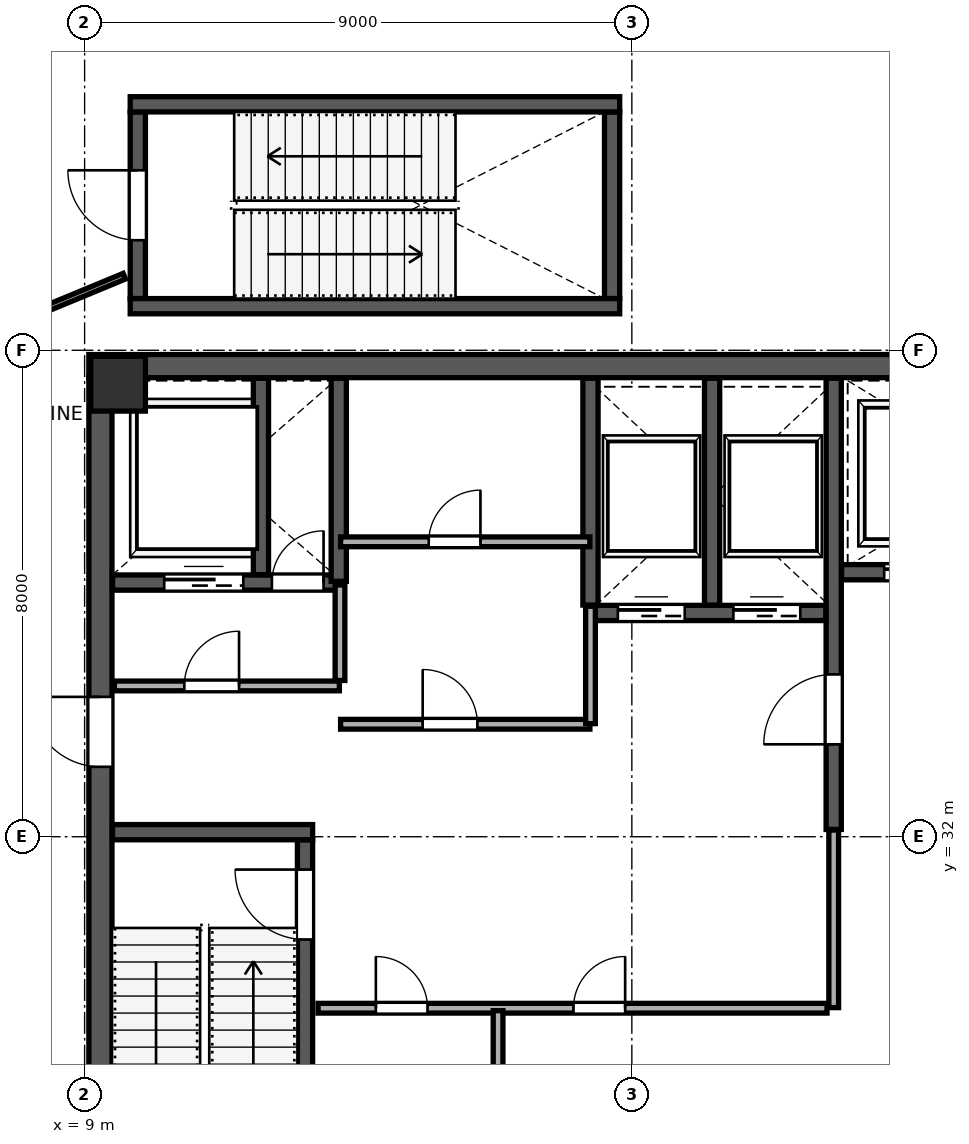
"""IFC4 building model, lengths in metres.
Left out: names, types, materials, properties, quantities, classifications, styles, units other than length and angle.
Written with IfcOpenShell. Run it as: python <this file> out.ifc"""

import sys

from ifc_helpers import new_model, si_unit, direction, frame, frame_2d, origin, origin_2d, place, context, subcontext, project, spatial, rectangle, extrude, source, transform, mapped, element, fill, save


model = new_model("IFC4")
c1 = context("Model", 3, precision=1e-05, world=origin(), true_north=direction((0.0, 1.0)))
c2 = subcontext(c1, "Body", "Model", "MODEL_VIEW")
j1 = project(units=[si_unit("LENGTHUNIT", "METRE"), si_unit("PLANEANGLEUNIT", "RADIAN")], contexts=[c1])
p1 = place(None, origin())
s1 = spatial("IfcSite", under=j1, at=p1, CompositionType="ELEMENT")
p2 = place(p1, origin())
s2 = spatial("IfcBuilding", under=s1, at=p2, CompositionType="ELEMENT")
p3 = place(p2, frame((0.0, 0.0, 355.2)))
s3 = spatial("IfcBuildingStorey", under=s2, at=p3, CompositionType="ELEMENT", Elevation=355.2)
m1 = source(origin(), c2, "Body", "SweptSolid", [
    extrude(rectangle(XDim=0.9, YDim=0.9, at=origin_2d()), origin(), (0.0, 0.0, 1.0), 4.799),
])
p4 = place(p3, frame((9.55, 39.45, 0.001), z_axis=(0.0, 0.0, 1.0), x_axis=(1.0, 0.0, 0.0)))
e1 = element("IfcColumn", 1, at=p4, inside=s3, PredefinedType="COLUMN", context=c2, shape_type="MappedRepresentation", body=[
    mapped(m1, transform((0.0, 0.0, 0.0), scale=1.0)),
])
p5 = place(p3, frame((26.171, 52.953, 0.0), z_axis=(0.0, 0.0, 1.0), x_axis=(-0.923878251708, -0.382686524484, 0.0)))
e2 = element("IfcWall", 2, at=p5, inside=s3, PredefinedType="SOLIDWALL", context=c2, shape_type="SweptSolid", body=[
    extrude(rectangle(XDim=26.668, YDim=0.24, at=frame_2d((13.334, 0.0))), origin(), (0.0, 0.0, 1.0), 4.52),
])
p6 = place(p5, frame((13.454, 0.0, 0.45)))
e3 = element("IfcOpeningElement", 3, at=p6, cuts=e2, PredefinedType="OPENING", context=c2, shape_type="SweptSolid", body=[
    extrude(rectangle(XDim=3.2, YDim=2.5, at=frame_2d((1.6, 1.25))), frame((0.0, 0.13, 0.0), z_axis=(0.0, -1.0, 0.0), x_axis=(1.0, 0.0, 0.0)), (0.0, 0.0, 1.0), 0.26),
])
p7 = place(p5, frame((21.304, 0.0, 0.45)))
e4 = element("IfcOpeningElement", 4, at=p7, cuts=e2, PredefinedType="OPENING", context=c2, shape_type="SweptSolid", body=[
    extrude(rectangle(XDim=3.2, YDim=2.5, at=frame_2d((1.6, 1.25))), frame((0.0, 0.13, 0.0), z_axis=(0.0, -1.0, 0.0), x_axis=(1.0, 0.0, 0.0)), (0.0, 0.0, 1.0), 0.26),
])
p8 = place(p3, frame((9.26, 24.45, 0.0), z_axis=(0.0, 0.0, 1.0), x_axis=(0.0, 1.0, 0.0)))
e5 = element("IfcWall", 5, at=p8, inside=s3, PredefinedType="SHEAR", context=c2, shape_type="SweptSolid", body=[
    extrude(rectangle(XDim=15.1, YDim=0.38, at=frame_2d((7.55, 0.0))), origin(), (0.0, 0.0, 1.0), 4.52),
])
p9 = place(p8, frame((8.7, 0.0, 0.0)))
e6 = element("IfcOpeningElement", 6, at=p9, cuts=e5, PredefinedType="OPENING", context=c2, shape_type="SweptSolid", body=[
    extrude(rectangle(XDim=1.15, YDim=2.2, at=frame_2d((0.575, 1.1))), frame((0.0, 0.2, 0.0), z_axis=(0.0, -1.0, 0.0), x_axis=(1.0, 0.0, 0.0)), (0.0, 0.0, 1.0), 0.4),
])
p10 = place(p3, frame((9.07, 39.74, 0.0), z_axis=(0.0, 0.0, 1.0), x_axis=(1.0, 0.0, 0.0)))
e7 = element("IfcWall", 7, at=p10, inside=s3, PredefinedType="SHEAR", context=c2, shape_type="SweptSolid", body=[
    extrude(rectangle(XDim=17.86, YDim=0.38, at=frame_2d((8.93, 0.0))), origin(), (0.0, 0.0, 1.0), 4.52),
])
p11 = place(p3, frame((12.625, 24.46, 0.0), z_axis=(0.0, 0.0, 1.0), x_axis=(0.0, 1.0, 0.0)))
e8 = element("IfcWall", 8, at=p11, inside=s3, PredefinedType="SHEAR", context=c2, shape_type="SweptSolid", body=[
    extrude(rectangle(XDim=7.49, YDim=0.25, at=frame_2d((3.745, 0.0))), origin(), (0.0, 0.0, 1.0), 4.52),
])
p12 = place(p11, frame((5.85, 0.0, 0.0)))
e9 = element("IfcOpeningElement", 9, at=p12, cuts=e8, PredefinedType="OPENING", context=c2, shape_type="SweptSolid", body=[
    extrude(rectangle(XDim=1.15, YDim=2.2, at=frame_2d((0.575, 1.1))), frame((0.0, 0.135, 0.0), z_axis=(0.0, -1.0, 0.0), x_axis=(1.0, 0.0, 0.0)), (0.0, 0.0, 1.0), 0.27),
])
p13 = place(p3, frame((9.46, 32.075, 0.0), z_axis=(0.0, 0.0, 1.0), x_axis=(1.0, 0.0, 0.0)))
e10 = element("IfcWall", 10, at=p13, inside=s3, PredefinedType="SHEAR", context=c2, shape_type="SweptSolid", body=[
    extrude(rectangle(XDim=3.29, YDim=0.25, at=frame_2d((1.645, 0.0))), origin(), (0.0, 0.0, 1.0), 4.52),
])
p14 = place(p3, frame((21.32, 32.12, 0.0), z_axis=(0.0, 0.0, 1.0), x_axis=(0.0, 1.0, 0.0)))
e11 = element("IfcWall", 11, at=p14, inside=s3, PredefinedType="SHEAR", context=c2, shape_type="SweptSolid", body=[
    extrude(rectangle(XDim=7.42, YDim=0.25, at=frame_2d((3.71, 0.0))), origin(), (0.0, 0.0, 1.0), 4.52),
])
p15 = place(p14, frame((1.4, 0.0, 0.0)))
e12 = element("IfcOpeningElement", 12, at=p15, cuts=e11, PredefinedType="OPENING", context=c2, shape_type="SweptSolid", body=[
    extrude(rectangle(XDim=1.15, YDim=2.2, at=frame_2d((0.575, 1.1))), frame((0.0, 0.135, 0.0), z_axis=(0.0, -1.0, 0.0), x_axis=(1.0, 0.0, 0.0)), (0.0, 0.0, 1.0), 0.27),
])
p16 = place(p3, frame((9.46, 36.18, 0.0), z_axis=(0.0, 0.0, 1.0), x_axis=(1.0, 0.0, 0.0)))
e13 = element("IfcWall", 13, at=p16, inside=s3, PredefinedType="SHEAR", context=c2, shape_type="SweptSolid", body=[
    extrude(rectangle(XDim=3.79, YDim=0.25, at=frame_2d((1.895, 0.0))), origin(), (0.0, 0.0, 1.0), 4.52),
])
p17 = place(p16, frame((2.62, 0.0, 0.0)))
e14 = element("IfcOpeningElement", 14, at=p17, cuts=e13, PredefinedType="OPENING", context=c2, shape_type="SweptSolid", body=[
    extrude(rectangle(XDim=0.85, YDim=2.1, at=frame_2d((0.425, 1.05))), frame((0.0, 0.135, 0.0), z_axis=(0.0, -1.0, 0.0), x_axis=(1.0, 0.0, 0.0)), (0.0, 0.0, 1.0), 0.27),
])
p18 = place(p16, frame((0.85, 0.0, 0.0)))
e15 = element("IfcOpeningElement", 15, at=p18, cuts=e13, PredefinedType="OPENING", context=c2, shape_type="SweptSolid", body=[
    extrude(rectangle(XDim=1.3, YDim=2.25, at=frame_2d((0.65, 1.125))), frame((0.0, 0.135, 0.0), z_axis=(0.0, -1.0, 0.0), x_axis=(1.0, 0.0, 0.0)), (0.0, 0.0, 1.0), 0.27),
])
p19 = place(p3, frame((11.9, 36.31, 0.0), z_axis=(0.0, 0.0, 1.0), x_axis=(0.0, 1.0, 0.0)))
e16 = element("IfcWall", 16, at=p19, inside=s3, PredefinedType="SHEAR", context=c2, shape_type="SweptSolid", body=[
    extrude(rectangle(XDim=3.23, YDim=0.25, at=frame_2d((1.615, 0.0))), origin(), (0.0, 0.0, 1.0), 4.52),
])
p20 = place(p3, frame((21.45, 36.35, 0.0), z_axis=(0.0, 0.0, 1.0), x_axis=(1.0, 0.0, 0.0)))
e17 = element("IfcWall", 17, at=p20, inside=s3, PredefinedType="SHEAR", context=c2, shape_type="SweptSolid", body=[
    extrude(rectangle(XDim=5.09, YDim=0.25, at=frame_2d((2.545, 0.0))), origin(), (0.0, 0.0, 1.0), 4.52),
])
p21 = place(p20, frame((0.7, 0.0, 0.0)))
e18 = element("IfcOpeningElement", 18, at=p21, cuts=e17, PredefinedType="OPENING", context=c2, shape_type="SweptSolid", body=[
    extrude(rectangle(XDim=1.2, YDim=2.2, at=frame_2d((0.6, 1.1))), frame((0.0, 0.135, 0.0), z_axis=(0.0, -1.0, 0.0), x_axis=(1.0, 0.0, 0.0)), (0.0, 0.0, 1.0), 0.27),
])
p22 = place(p20, frame((3.25, 0.0, 0.0)))
e19 = element("IfcOpeningElement", 19, at=p22, cuts=e17, PredefinedType="OPENING", context=c2, shape_type="SweptSolid", body=[
    extrude(rectangle(XDim=1.2, YDim=2.2, at=frame_2d((0.6, 1.1))), frame((0.0, 0.135, 0.0), z_axis=(0.0, -1.0, 0.0), x_axis=(1.0, 0.0, 0.0)), (0.0, 0.0, 1.0), 0.27),
])
p23 = place(p3, frame((13.18, 36.2, 0.0), z_axis=(0.0, 0.0, 1.0), x_axis=(0.0, 1.0, 0.0)))
e20 = element("IfcWall", 20, at=p23, inside=s3, PredefinedType="SHEAR", context=c2, shape_type="SweptSolid", body=[
    extrude(rectangle(XDim=3.34, YDim=0.25, at=frame_2d((1.67, 0.0))), origin(), (0.0, 0.0, 1.0), 4.52),
])
p24 = place(p3, frame((17.32, 35.68, 0.0), z_axis=(0.0, 0.0, 1.0), x_axis=(1.0, 0.0, 0.0)))
e21 = element("IfcWall", 21, at=p24, inside=s3, PredefinedType="SHEAR", context=c2, shape_type="SweptSolid", body=[
    extrude(rectangle(XDim=3.87, YDim=0.25, at=frame_2d((1.935, 0.0))), origin(), (0.0, 0.0, 1.0), 4.52),
])
p25 = place(p24, frame((0.45, 0.0, 0.0)))
e22 = element("IfcOpeningElement", 22, at=p25, cuts=e21, PredefinedType="OPENING", context=c2, shape_type="SweptSolid", body=[
    extrude(rectangle(XDim=1.1, YDim=2.2, at=frame_2d((0.55, 1.1))), frame((0.0, 0.135, 0.0), z_axis=(0.0, -1.0, 0.0), x_axis=(1.0, 0.0, 0.0)), (0.0, 0.0, 1.0), 0.27),
])
p26 = place(p24, frame((2.35, 0.0, 0.0)))
e23 = element("IfcOpeningElement", 23, at=p26, cuts=e21, PredefinedType="OPENING", context=c2, shape_type="SweptSolid", body=[
    extrude(rectangle(XDim=1.1, YDim=2.2, at=frame_2d((0.55, 1.1))), frame((0.0, 0.135, 0.0), z_axis=(0.0, -1.0, 0.0), x_axis=(1.0, 0.0, 0.0)), (0.0, 0.0, 1.0), 0.27),
])
for number, where, z_axis, x_axis in (
    (24, (17.32, 35.81, 0.0), (0.0, 0.0, 1.0), (0.0, 1.0, 0.0)),
    (25, (19.32, 35.81, 0.0), (0.0, 0.0, 1.0), (0.0, 1.0, 0.0)),
):
    element("IfcWall", number, at=place(p3, frame(where, z_axis=z_axis, x_axis=x_axis)), inside=s3, PredefinedType="SHEAR", context=c2, shape_type="SweptSolid", body=[
        extrude(rectangle(XDim=3.73, YDim=0.25, at=frame_2d((1.865, 0.0))), origin(), (0.0, 0.0, 1.0), 4.52),
    ])
p27 = place(p3, frame((9.875, 40.85, 0.0), z_axis=(0.0, 0.0, 1.0), x_axis=(0.0, 1.0, 0.0)))
e26 = element("IfcWall", 26, at=p27, inside=s3, PredefinedType="SHEAR", context=c2, shape_type="SweptSolid", body=[
    extrude(rectangle(XDim=3.07, YDim=0.25, at=frame_2d((1.535, 0.0))), origin(), (0.0, 0.0, 1.0), 4.52),
])
p28 = place(p27, frame((0.96, 0.0, 0.0)))
e27 = element("IfcOpeningElement", 27, at=p28, cuts=e26, PredefinedType="OPENING", context=c2, shape_type="SweptSolid", body=[
    extrude(rectangle(XDim=1.15, YDim=2.2, at=frame_2d((0.575, 1.1))), frame((0.0, 0.135, 0.0), z_axis=(0.0, -1.0, 0.0), x_axis=(1.0, 0.0, 0.0)), (0.0, 0.0, 1.0), 0.27),
])
p29 = place(p3, frame((17.675, 40.85, 0.0), z_axis=(0.0, 0.0, 1.0), x_axis=(0.0, 1.0, 0.0)))
e28 = element("IfcWall", 28, at=p29, inside=s3, PredefinedType="SHEAR", context=c2, shape_type="SweptSolid", body=[
    extrude(rectangle(XDim=3.07, YDim=0.25, at=frame_2d((1.535, 0.0))), origin(), (0.0, 0.0, 1.0), 4.52),
])
for number, where, z_axis, x_axis in (
    (29, (9.75, 40.725, 0.0), (0.0, 0.0, 1.0), (1.0, 0.0, 0.0)),
    (30, (9.75, 44.045, 0.0), (0.0, 0.0, 1.0), (1.0, 0.0, 0.0)),
):
    element("IfcWall", number, at=place(p3, frame(where, z_axis=z_axis, x_axis=x_axis)), inside=s3, PredefinedType="SHEAR", context=c2, shape_type="SweptSolid", body=[
        extrude(rectangle(XDim=8.05, YDim=0.25, at=frame_2d((4.025, 0.0))), origin(), (0.0, 0.0, 1.0), 4.52),
    ])
p30 = place(p3, frame((9.49, 34.48, 0.0), z_axis=(0.0, 0.0, 1.0), x_axis=(1.0, 0.0, 0.0)))
e31 = element("IfcWall", 31, at=p30, inside=s3, PredefinedType="PARTITIONING", context=c2, shape_type="SweptSolid", body=[
    extrude(rectangle(XDim=3.7, YDim=0.16, at=frame_2d((1.85, 0.0))), origin(), (0.0, 0.0, 1.0), 4.52),
])
p31 = place(p30, frame((1.15, 0.0, 0.0)))
e32 = element("IfcOpeningElement", 32, at=p31, cuts=e31, PredefinedType="OPENING", context=c2, shape_type="SweptSolid", body=[
    extrude(rectangle(XDim=0.9, YDim=2.15, at=frame_2d((0.45, 1.075))), frame((0.0, 0.09, 0.0), z_axis=(0.0, -1.0, 0.0), x_axis=(1.0, 0.0, 0.0)), (0.0, 0.0, 1.0), 0.18),
])
p32 = place(p3, frame((13.2, 34.57, 0.0), z_axis=(0.0, 0.0, 1.0), x_axis=(0.0, 1.0, 0.0)))
e33 = element("IfcWall", 33, at=p32, inside=s3, PredefinedType="PARTITIONING", context=c2, shape_type="SweptSolid", body=[
    extrude(rectangle(XDim=1.57, YDim=0.16, at=frame_2d((0.785, 0.0))), origin(), (0.0, 0.0, 1.0), 4.52),
])
p33 = place(p3, frame((13.21, 33.85, 0.0), z_axis=(0.0, 0.0, 1.0), x_axis=(1.0, 0.0, 0.0)))
e34 = element("IfcWall", 34, at=p33, inside=s3, PredefinedType="PARTITIONING", context=c2, shape_type="SweptSolid", body=[
    extrude(rectangle(XDim=4.1, YDim=0.16, at=frame_2d((2.05, 0.0))), origin(), (0.0, 0.0, 1.0), 4.52),
])
p34 = place(p33, frame((1.35, 0.0, 0.0)))
e35 = element("IfcOpeningElement", 35, at=p34, cuts=e34, PredefinedType="OPENING", context=c2, shape_type="SweptSolid", body=[
    extrude(rectangle(XDim=0.9, YDim=2.15, at=frame_2d((0.45, 1.075))), frame((0.0, 0.09, 0.0), z_axis=(0.0, -1.0, 0.0), x_axis=(1.0, 0.0, 0.0)), (0.0, 0.0, 1.0), 0.18),
])
p35 = place(p3, frame((17.32, 33.86, 0.0), z_axis=(0.0, 0.0, 1.0), x_axis=(0.0, 1.0, 0.0)))
e36 = element("IfcWall", 36, at=p35, inside=s3, PredefinedType="PARTITIONING", context=c2, shape_type="SweptSolid", body=[
    extrude(rectangle(XDim=1.93, YDim=0.16, at=frame_2d((0.965, 0.0))), origin(), (0.0, 0.0, 1.0), 4.52),
])
p36 = place(p3, frame((13.21, 36.85, 0.0), z_axis=(0.0, 0.0, 1.0), x_axis=(1.0, 0.0, 0.0)))
e37 = element("IfcWall", 37, at=p36, inside=s3, PredefinedType="PARTITIONING", context=c2, shape_type="SweptSolid", body=[
    extrude(rectangle(XDim=4.1, YDim=0.16, at=frame_2d((2.05, 0.0))), origin(), (0.0, 0.0, 1.0), 4.52),
])
p37 = place(p36, frame((1.45, 0.0, 0.0)))
e38 = element("IfcOpeningElement", 38, at=p37, cuts=e37, PredefinedType="OPENING", context=c2, shape_type="SweptSolid", body=[
    extrude(rectangle(XDim=0.85, YDim=2.1, at=frame_2d((0.425, 1.05))), frame((0.0, 0.09, 0.0), z_axis=(0.0, -1.0, 0.0), x_axis=(1.0, 0.0, 0.0)), (0.0, 0.0, 1.0), 0.18),
])
p38 = place(p3, frame((12.84, 29.18, 0.0), z_axis=(0.0, 0.0, 1.0), x_axis=(1.0, 0.0, 0.0)))
e39 = element("IfcWall", 39, at=p38, inside=s3, PredefinedType="PARTITIONING", context=c2, shape_type="SweptSolid", body=[
    extrude(rectangle(XDim=8.37, YDim=0.16, at=frame_2d((4.185, 0.0))), origin(), (0.0, 0.0, 1.0), 4.52),
])
p39 = place(p38, frame((0.95, 0.0, 0.0)))
e40 = element("IfcOpeningElement", 40, at=p39, cuts=e39, PredefinedType="OPENING", context=c2, shape_type="SweptSolid", body=[
    extrude(rectangle(XDim=0.85, YDim=2.1, at=frame_2d((0.425, 1.05))), frame((0.0, 0.09, 0.0), z_axis=(0.0, -1.0, 0.0), x_axis=(1.0, 0.0, 0.0)), (0.0, 0.0, 1.0), 0.18),
])
p40 = place(p38, frame((4.2, 0.0, 0.0)))
e41 = element("IfcOpeningElement", 41, at=p40, cuts=e39, PredefinedType="OPENING", context=c2, shape_type="SweptSolid", body=[
    extrude(rectangle(XDim=0.85, YDim=2.1, at=frame_2d((0.425, 1.05))), frame((0.0, 0.09, 0.0), z_axis=(0.0, -1.0, 0.0), x_axis=(1.0, 0.0, 0.0)), (0.0, 0.0, 1.0), 0.18),
])
p41 = place(p3, frame((15.8, 24.54, 0.0), z_axis=(0.0, 0.0, 1.0), x_axis=(0.0, 1.0, 0.0)))
e42 = element("IfcWall", 42, at=p41, inside=s3, PredefinedType="PARTITIONING", context=c2, shape_type="SweptSolid", body=[
    extrude(rectangle(XDim=4.6, YDim=0.16, at=frame_2d((2.3, 0.0))), origin(), (0.0, 0.0, 1.0), 4.52),
])
p42 = place(p3, frame((21.32, 29.19, 0.0), z_axis=(0.0, 0.0, 1.0), x_axis=(0.0, 1.0, 0.0)))
e43 = element("IfcWall", 43, at=p42, inside=s3, PredefinedType="PARTITIONING", context=c2, shape_type="SweptSolid", body=[
    extrude(rectangle(XDim=2.92, YDim=0.16, at=frame_2d((1.46, 0.0))), origin(), (0.0, 0.0, 1.0), 4.52),
])
p43 = place(p3, frame((3.923, 34.742, 0.0), z_axis=(0.0, 0.0, 1.0), x_axis=(0.382686508818, -0.923878258197, 0.0)))
e44 = element("IfcWall", 44, at=p43, inside=s3, PredefinedType="PARTITIONING", context=c2, shape_type="SweptSolid", body=[
    extrude(rectangle(XDim=12.39, YDim=0.16, at=frame_2d((6.195, 0.0))), origin(), (0.0, 0.0, 1.0), 4.52),
])
p44 = place(p3, frame((4.145, 38.936, 0.0), z_axis=(0.0, 0.0, 1.0), x_axis=(0.923878093623, 0.38268690613, 0.0)))
e45 = element("IfcWall", 45, at=p44, inside=s3, PredefinedType="PARTITIONING", context=c2, shape_type="SweptSolid", body=[
    extrude(rectangle(XDim=5.962, YDim=0.1, at=frame_2d((2.981, 0.0))), origin(), (0.0, 0.0, 1.0), 4.52),
])
p45 = place(p3, frame((21.13, 20.298, 0.0), z_axis=(0.0, 0.0, 1.0), x_axis=(0.923880046805, 0.382682190748, 0.0)))
e46 = element("IfcWall", 46, at=p45, inside=s3, PredefinedType="PARTITIONING", context=c2, shape_type="SweptSolid", body=[
    extrude(rectangle(XDim=20.84, YDim=0.16, at=frame_2d((10.42, 0.0))), origin(), (0.0, 0.0, 1.0), 4.52),
])
m2 = source(origin(), c2, "Body", "SweptSolid", [
    extrude(rectangle(XDim=1.15, YDim=2.2, at=frame_2d((0.575, 1.1))), frame((0.0, 0.025, 0.0), z_axis=(0.0, -1.0, 0.0), x_axis=(1.0, 0.0, 0.0)), (0.0, 0.0, 1.0), 0.05),
])
p46 = place(p12, origin())
e47 = element("IfcDoor", 47, at=p46, inside=s3, OperationType="SINGLE_SWING_RIGHT", PredefinedType="DOOR", context=c2, shape_type="MappedRepresentation", body=[
    mapped(m2, transform((0.0, 0.0, 0.0), scale=1.0)),
])
fill(e9, e47)
m3 = source(origin(), c2, "Body", "SweptSolid", [
    extrude(rectangle(XDim=1.15, YDim=2.2, at=frame_2d((0.575, 1.1))), frame((0.0, 0.025, 0.0), z_axis=(0.0, -1.0, 0.0), x_axis=(1.0, 0.0, 0.0)), (0.0, 0.0, 1.0), 0.05),
])
p47 = place(p15, origin())
e48 = element("IfcDoor", 48, at=p47, inside=s3, OperationType="SINGLE_SWING_LEFT", PredefinedType="DOOR", context=c2, shape_type="MappedRepresentation", body=[
    mapped(m3, transform((0.0, 0.0, 0.0), scale=1.0)),
])
fill(e12, e48)
p48 = place(p9, origin())
e49 = element("IfcDoor", 49, at=p48, inside=s3, OperationType="SINGLE_SWING_RIGHT", PredefinedType="DOOR", context=c2, shape_type="MappedRepresentation", body=[
    mapped(m3, transform((0.0, 0.0, 0.0), scale=1.0)),
])
fill(e6, e49)
p49 = place(p28, origin())
e50 = element("IfcDoor", 50, at=p49, inside=s3, OperationType="SINGLE_SWING_RIGHT", PredefinedType="DOOR", context=c2, shape_type="MappedRepresentation", body=[
    mapped(m3, transform((0.0, 0.0, 0.0), scale=1.0)),
])
fill(e27, e50)
m4 = source(origin(), c2, "Body", "SweptSolid", [
    extrude(rectangle(XDim=0.85, YDim=2.1, at=frame_2d((0.425, 1.05))), frame((0.0, 0.025, 0.0), z_axis=(0.0, -1.0, 0.0), x_axis=(1.0, 0.0, 0.0)), (0.0, 0.0, 1.0), 0.05),
])
p50 = place(p17, origin())
e51 = element("IfcDoor", 51, at=p50, inside=s3, OperationType="SINGLE_SWING_RIGHT", PredefinedType="DOOR", context=c2, shape_type="MappedRepresentation", body=[
    mapped(m4, transform((0.0, 0.0, 0.0), scale=1.0)),
])
fill(e14, e51)
m5 = source(origin(), c2, "Body", "SweptSolid", [
    extrude(rectangle(XDim=1.1, YDim=2.2, at=frame_2d((0.55, 1.1))), frame((0.0, 0.025, 0.0), z_axis=(0.0, -1.0, 0.0), x_axis=(1.0, 0.0, 0.0)), (0.0, 0.0, 1.0), 0.05),
])
p51 = place(p25, origin())
e52 = element("IfcDoor", 52, at=p51, inside=s3, OperationType="SLIDING_TO_LEFT", PredefinedType="DOOR", context=c2, shape_type="MappedRepresentation", body=[
    mapped(m5, transform((0.0, 0.0, 0.0), scale=1.0)),
])
fill(e22, e52)
p52 = place(p26, origin())
e53 = element("IfcDoor", 53, at=p52, inside=s3, OperationType="SLIDING_TO_RIGHT", PredefinedType="DOOR", context=c2, shape_type="MappedRepresentation", body=[
    mapped(m5, transform((0.0, 0.0, 0.0), scale=1.0)),
])
fill(e23, e53)
m6 = source(origin(), c2, "Body", "SweptSolid", [
    extrude(rectangle(XDim=1.2, YDim=2.2, at=frame_2d((0.6, 1.1))), frame((0.0, 0.025, 0.0), z_axis=(0.0, -1.0, 0.0), x_axis=(1.0, 0.0, 0.0)), (0.0, 0.0, 1.0), 0.05),
])
p53 = place(p21, origin())
e54 = element("IfcDoor", 54, at=p53, inside=s3, OperationType="SLIDING_TO_LEFT", PredefinedType="DOOR", context=c2, shape_type="MappedRepresentation", body=[
    mapped(m6, transform((0.0, 0.0, 0.0), scale=1.0)),
])
fill(e18, e54)
m7 = source(origin(), c2, "Body", "SweptSolid", [
    extrude(rectangle(XDim=1.3, YDim=2.25, at=frame_2d((0.65, 1.125))), frame((0.0, 0.025, 0.0), z_axis=(0.0, -1.0, 0.0), x_axis=(1.0, 0.0, 0.0)), (0.0, 0.0, 1.0), 0.05),
])
p54 = place(p18, origin())
e55 = element("IfcDoor", 55, at=p54, inside=s3, OperationType="SLIDING_TO_LEFT", PredefinedType="DOOR", context=c2, shape_type="MappedRepresentation", body=[
    mapped(m7, transform((0.0, 0.0, 0.0), scale=1.0)),
])
fill(e15, e55)
m8 = source(origin(), c2, "Body", "SweptSolid", [
    extrude(rectangle(XDim=0.9, YDim=2.15, at=frame_2d((0.45, 1.075))), frame((0.0, 0.025, 0.0), z_axis=(0.0, -1.0, 0.0), x_axis=(1.0, 0.0, 0.0)), (0.0, 0.0, 1.0), 0.05),
])
p55 = place(p31, origin())
e56 = element("IfcDoor", 56, at=p55, inside=s3, OperationType="SINGLE_SWING_RIGHT", PredefinedType="DOOR", context=c2, shape_type="MappedRepresentation", body=[
    mapped(m8, transform((0.0, 0.0, 0.0), scale=1.0)),
])
fill(e32, e56)
p56 = place(p34, origin())
e57 = element("IfcDoor", 57, at=p56, inside=s3, OperationType="SINGLE_SWING_LEFT", PredefinedType="DOOR", context=c2, shape_type="MappedRepresentation", body=[
    mapped(m8, transform((0.0, 0.0, 0.0), scale=1.0)),
])
fill(e35, e57)
p57 = place(p37, origin())
e58 = element("IfcDoor", 58, at=p57, inside=s3, OperationType="SINGLE_SWING_RIGHT", PredefinedType="DOOR", context=c2, shape_type="MappedRepresentation", body=[
    mapped(m4, transform((0.0, 0.0, 0.0), scale=1.0)),
])
fill(e38, e58)
p58 = place(p39, origin())
e59 = element("IfcDoor", 59, at=p58, inside=s3, OperationType="SINGLE_SWING_LEFT", PredefinedType="DOOR", context=c2, shape_type="MappedRepresentation", body=[
    mapped(m4, transform((0.0, 0.0, 0.0), scale=1.0)),
])
fill(e40, e59)
p59 = place(p40, origin())
e60 = element("IfcDoor", 60, at=p59, inside=s3, OperationType="SINGLE_SWING_RIGHT", PredefinedType="DOOR", context=c2, shape_type="MappedRepresentation", body=[
    mapped(m4, transform((0.0, 0.0, 0.0), scale=1.0)),
])
fill(e41, e60)
save(model, sys.argv[1])
